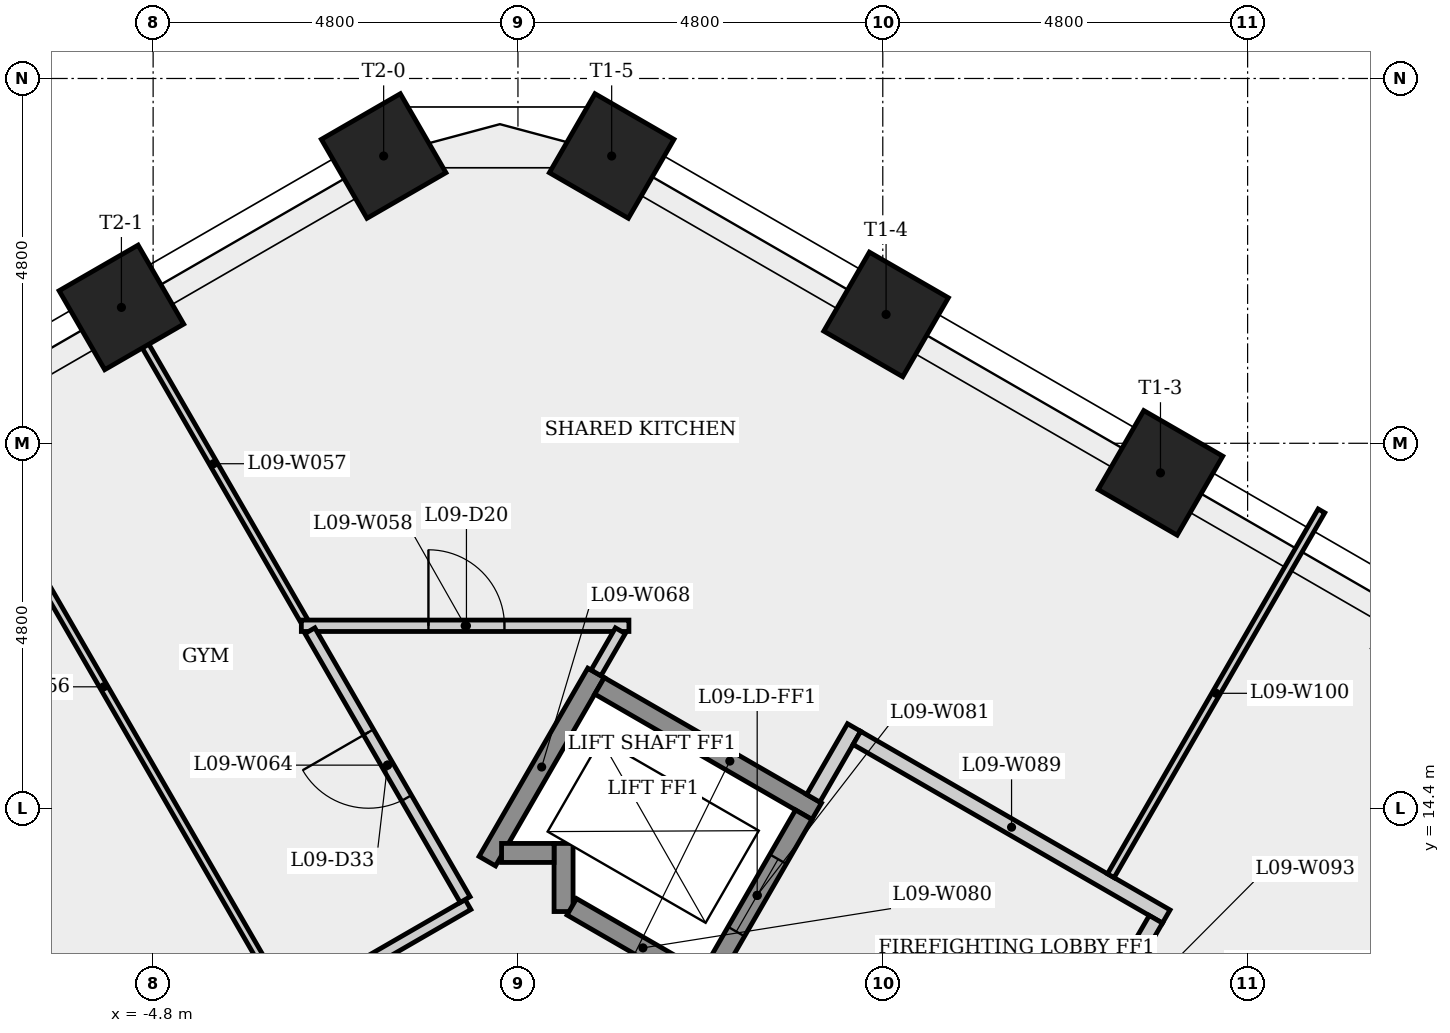
"""IFC4 building model, lengths in metres.
Left out: names, types, materials, properties, quantities, classifications, styles, units other than length and angle.
Written with IfcOpenShell. Run it as: python <this file> out.ifc"""

import sys

from ifc_helpers import new_model, si_unit, direction, frame, frame_2d, origin, origin_2d, place, context, subcontext, project, spatial, rectangle, extrude, element, fill, save


model = new_model("IFC4")
c1 = context("Model", 3, precision=1e-05, world=origin(), true_north=direction((0.0, 1.0)))
c2 = subcontext(c1, "Body", "Model", "MODEL_VIEW")
j1 = project(units=[si_unit("LENGTHUNIT", "METRE"), si_unit("PLANEANGLEUNIT", "RADIAN")], contexts=[c1])
p1 = place(None, origin())
s1 = spatial("IfcSite", under=j1, at=p1, CompositionType="ELEMENT")
p2 = place(p1, origin())
s2 = spatial("IfcBuilding", under=s1, at=p2, CompositionType="ELEMENT")
p3 = place(p2, frame((0.0, 0.0, 39.1)))
s3 = spatial("IfcBuildingStorey", under=s2, at=p3, CompositionType="ELEMENT", Elevation=39.1)
for number, where, z_axis, x_axis in (
    (1, (8.454, 18.811, 0.0), (0.0, 0.0, 1.0), (0.5, 0.866, 0.0)),
    (2, (4.843, 20.895, 0.0), (0.0, 0.0, 1.0), (0.5, 0.866, 0.0)),
    (3, (1.233, 22.98, 0.0), (0.0, 0.0, 1.0), (0.5, 0.866, 0.0)),
    (4, (-1.767, 22.98, 0.0), (0.0, 0.0, 1.0), (-0.5, 0.866, 0.0)),
    (5, (-5.217, 20.988, 0.0), (0.0, 0.0, 1.0), (-0.5, 0.866, 0.0)),
):
    element("IfcColumn", number, at=place(p3, frame(where, z_axis=z_axis, x_axis=x_axis)), inside=s3, PredefinedType="COLUMN", context=c2, shape_type="SweptSolid", body=[
        extrude(rectangle(XDim=1.2, YDim=1.2, at=origin_2d()), origin(), (0.0, 0.0, 1.0), 3.4),
    ])
p4 = place(p3, frame((-10.828, 7.259, 0.0), z_axis=(0.0, 0.0, 1.0), x_axis=(0.866023917287, 0.50000257468, 0.0)))
e6 = element("IfcWall", 6, at=p4, inside=s3, PredefinedType="PARTITIONING", context=c2, shape_type="SweptSolid", body=[
    extrude(rectangle(XDim=11.744, YDim=0.15, at=frame_2d((5.872, 0.0))), origin(), (0.0, 0.0, 1.0), 3.05),
])
p5 = place(p4, frame((5.887, 0.0, 0.0)))
e7 = element("IfcOpeningElement", 7, at=p5, cuts=e6, PredefinedType="OPENING", context=c2, shape_type="SweptSolid", body=[
    extrude(rectangle(XDim=1.0, YDim=2.1, at=frame_2d((0.5, 1.05))), frame((0.0, 0.085, 0.0), z_axis=(0.0, -1.0, 0.0), x_axis=(1.0, 0.0, 0.0)), (0.0, 0.0, 1.0), 0.17),
])
p6 = place(p3, frame((-3.049, 11.836, 0.0), z_axis=(0.0, 0.0, 1.0), x_axis=(-0.500018000043, 0.866015011206, 0.0)))
e8 = element("IfcWall", 8, at=p6, inside=s3, PredefinedType="PARTITIONING", context=c2, shape_type="SweptSolid", body=[
    extrude(rectangle(XDim=9.606, YDim=0.1, at=frame_2d((4.803, 0.0))), origin(), (0.0, 0.0, 1.0), 3.05),
])
p7 = place(p3, frame((-2.812, 16.864, 0.0), z_axis=(0.0, 0.0, 1.0), x_axis=(-0.49998363006, 0.866034854768, 0.0)))
e9 = element("IfcWall", 9, at=p7, inside=s3, PredefinedType="PARTITIONING", context=c2, shape_type="SweptSolid", body=[
    extrude(rectangle(XDim=4.774, YDim=0.1, at=frame_2d((2.387, 0.0))), origin(), (0.0, 0.0, 1.0), 3.05),
])
p8 = place(p3, frame((-2.85, 16.799, 0.0), z_axis=(0.0, 0.0, 1.0), x_axis=(1.0, 0.0, 0.0)))
e10 = element("IfcWall", 10, at=p8, inside=s3, PredefinedType="PARTITIONING", context=c2, shape_type="SweptSolid", body=[
    extrude(rectangle(XDim=4.31, YDim=0.15, at=frame_2d((2.155, 0.0))), origin(), (0.0, 0.0, 1.0), 3.05),
])
p9 = place(p8, frame((1.672, 0.0, 0.0)))
e11 = element("IfcOpeningElement", 11, at=p9, cuts=e10, PredefinedType="OPENING", context=c2, shape_type="SweptSolid", body=[
    extrude(rectangle(XDim=1.0, YDim=2.1, at=frame_2d((0.5, 1.05))), frame((0.0, 0.085, 0.0), z_axis=(0.0, -1.0, 0.0), x_axis=(1.0, 0.0, 0.0)), (0.0, 0.0, 1.0), 0.17),
])
p10 = place(p3, frame((-0.695, 13.196, 0.0), z_axis=(0.0, 0.0, 1.0), x_axis=(-0.49996389635, 0.866046247233, 0.0)))
e12 = element("IfcWall", 12, at=p10, inside=s3, PredefinedType="PARTITIONING", context=c2, shape_type="SweptSolid", body=[
    extrude(rectangle(XDim=4.085, YDim=0.15, at=frame_2d((2.042, 0.0))), origin(), (0.0, 0.0, 1.0), 3.05),
])
p11 = place(p10, frame((1.542, 0.0, 0.0)))
e13 = element("IfcOpeningElement", 13, at=p11, cuts=e12, PredefinedType="OPENING", context=c2, shape_type="SweptSolid", body=[
    extrude(rectangle(XDim=1.0, YDim=2.1, at=frame_2d((0.5, 1.05))), frame((0.0, 0.085, 0.0), z_axis=(0.0, -1.0, 0.0), x_axis=(1.0, 0.0, 0.0)), (0.0, 0.0, 1.0), 0.17),
])
p12 = place(p3, frame((-0.403, 13.702, 0.0), z_axis=(0.0, 0.0, 1.0), x_axis=(0.499976111731, 0.866039195244, 0.0)))
e14 = element("IfcWall", 14, at=p12, inside=s3, PredefinedType="SHEAR", context=c2, shape_type="SweptSolid", body=[
    extrude(rectangle(XDim=2.861, YDim=0.25, at=frame_2d((1.43, 0.0))), origin(), (0.0, 0.0, 1.0), 3.05),
])
p13 = place(p3, frame((0.6, 13.039, 0.0), z_axis=(0.0, 0.0, 1.0), x_axis=(0.0, 1.0, 0.0)))
e15 = element("IfcWall", 15, at=p13, inside=s3, PredefinedType="SHEAR", context=c2, shape_type="SweptSolid", body=[
    extrude(rectangle(XDim=0.896, YDim=0.25, at=frame_2d((0.448, 0.0))), origin(), (0.0, 0.0, 1.0), 3.05),
])
p14 = place(p3, frame((0.475, 13.81, 0.0), z_axis=(0.0, 0.0, 1.0), x_axis=(-1.0, 0.0, 0.0)))
e16 = element("IfcWall", 16, at=p14, inside=s3, PredefinedType="SHEAR", context=c2, shape_type="SweptSolid", body=[
    extrude(rectangle(XDim=0.691, YDim=0.25, at=frame_2d((0.345, 0.0))), origin(), (0.0, 0.0, 1.0), 3.4),
])
p15 = place(p3, frame((1.073, 16.008, 0.0), z_axis=(0.0, 0.0, 1.0), x_axis=(0.866040211805, -0.499974350878, 0.0)))
e17 = element("IfcWall", 17, at=p15, inside=s3, PredefinedType="SHEAR", context=c2, shape_type="SweptSolid", body=[
    extrude(rectangle(XDim=3.3, YDim=0.25, at=frame_2d((1.65, 0.0))), origin(), (0.0, 0.0, 1.0), 3.05),
])
p16 = place(p3, frame((1.347, 16.734, 0.0), z_axis=(0.0, 0.0, 1.0), x_axis=(-0.499909361484, -0.866077727632, 0.0)))
e18 = element("IfcWall", 18, at=p16, inside=s3, PredefinedType="PARTITIONING", context=c2, shape_type="SweptSolid", body=[
    extrude(rectangle(XDim=0.641, YDim=0.15, at=frame_2d((0.32, 0.0))), origin(), (0.0, 0.0, 1.0), 3.05),
])
p17 = place(p3, frame((2.581, 12.02, 0.0), z_axis=(0.0, 0.0, 1.0), x_axis=(-0.86603892542, 0.499976579108, 0.0)))
e19 = element("IfcWall", 19, at=p17, inside=s3, PredefinedType="SHEAR", context=c2, shape_type="SweptSolid", body=[
    extrude(rectangle(XDim=2.162, YDim=0.25, at=frame_2d((1.081, 0.0))), origin(), (0.0, 0.0, 1.0), 3.05),
])
p18 = place(p3, frame((2.535, 12.191, 0.0), z_axis=(0.0, 0.0, 1.0), x_axis=(0.500061746146, 0.865989751695, 0.0)))
e20 = element("IfcWall", 20, at=p18, inside=s3, PredefinedType="SHEAR", context=c2, shape_type="SweptSolid", body=[
    extrude(rectangle(XDim=2.45, YDim=0.25, at=frame_2d((1.225, 0.0))), origin(), (0.0, 0.0, 1.0), 3.4),
])
p19 = place(p18, frame((0.675, 0.0, 0.0)))
e21 = element("IfcOpeningElement", 21, at=p19, cuts=e20, PredefinedType="OPENING", context=c2, shape_type="SweptSolid", body=[
    extrude(rectangle(XDim=1.1, YDim=2.1, at=frame_2d((0.55, 1.05))), frame((0.0, 0.135, 0.0), z_axis=(0.0, -1.0, 0.0), x_axis=(1.0, 0.0, 0.0)), (0.0, 0.0, 1.0), 0.27),
])
p20 = place(p3, frame((3.885, 14.529, 0.0), z_axis=(0.0, 0.0, 1.0), x_axis=(0.499997628298, 0.866026773083, 0.0)))
e22 = element("IfcWall", 22, at=p20, inside=s3, PredefinedType="PARTITIONING", context=c2, shape_type="SweptSolid", body=[
    extrude(rectangle(XDim=1.075, YDim=0.2, at=frame_2d((0.538, 0.0))), origin(), (0.0, 0.0, 1.0), 3.05),
])
p21 = place(p3, frame((4.459, 15.323, 0.0), z_axis=(0.0, 0.0, 1.0), x_axis=(0.866016039709, -0.500016218704, 0.0)))
e23 = element("IfcWall", 23, at=p21, inside=s3, PredefinedType="PARTITIONING", context=c2, shape_type="SweptSolid", body=[
    extrude(rectangle(XDim=4.7, YDim=0.2, at=frame_2d((2.35, 0.0))), origin(), (0.0, 0.0, 1.0), 3.05),
])
p22 = place(p3, frame((6.48, 9.624, 0.0), z_axis=(0.0, 0.0, 1.0), x_axis=(0.500017246033, 0.866015446554, 0.0)))
e24 = element("IfcWall", 24, at=p22, inside=s3, PredefinedType="SHEAR", context=c2, shape_type="SweptSolid", body=[
    extrude(rectangle(XDim=3.25, YDim=0.25, at=frame_2d((1.625, 0.0))), origin(), (0.0, 0.0, 1.0), 3.05),
])
p23 = place(p22, frame((1.125, 0.0, 0.0)))
e25 = element("IfcOpeningElement", 25, at=p23, cuts=e24, PredefinedType="OPENING", context=c2, shape_type="SweptSolid", body=[
    extrude(rectangle(XDim=1.0, YDim=2.1, at=frame_2d((0.5, 1.05))), frame((0.0, 0.135, 0.0), z_axis=(0.0, -1.0, 0.0), x_axis=(1.0, 0.0, 0.0)), (0.0, 0.0, 1.0), 0.27),
])
p24 = place(p3, frame((7.8, 13.51, 0.0), z_axis=(0.0, 0.0, 1.0), x_axis=(0.4999855202, 0.866033763539, 0.0)))
e26 = element("IfcWall", 26, at=p24, inside=s3, PredefinedType="PARTITIONING", context=c2, shape_type="SweptSolid", body=[
    extrude(rectangle(XDim=5.543, YDim=0.1, at=frame_2d((2.771, 0.0))), origin(), (0.0, 0.0, 1.0), 3.05),
])
p25 = place(p3, frame((8.393, 12.937, 0.0), z_axis=(0.0, 0.0, 1.0), x_axis=(-0.500065409566, -0.86598763626, 0.0)))
e27 = element("IfcWall", 27, at=p25, inside=s3, PredefinedType="PARTITIONING", context=c2, shape_type="SweptSolid", body=[
    extrude(rectangle(XDim=0.575, YDim=0.2, at=frame_2d((0.288, 0.0))), origin(), (0.0, 0.0, 1.0), 3.05),
])
p26 = place(p19, origin())
e28 = element("IfcDoor", 28, at=p26, inside=s3, OperationType="SLIDING_TO_LEFT", PredefinedType="DOOR", context=c2, shape_type="SweptSolid", body=[
    extrude(rectangle(XDim=1.1, YDim=2.1, at=frame_2d((0.55, 1.05))), frame((0.0, 0.025, 0.0), z_axis=(0.0, -1.0, 0.0), x_axis=(1.0, 0.0, 0.0)), (0.0, 0.0, 1.0), 0.05),
])
fill(e21, e28)
p27 = place(p9, origin())
e29 = element("IfcDoor", 29, at=p27, inside=s3, OperationType="SINGLE_SWING_LEFT", PredefinedType="DOOR", context=c2, shape_type="SweptSolid", body=[
    extrude(rectangle(XDim=1.0, YDim=2.1, at=frame_2d((0.5, 1.05))), frame((0.0, 0.025, 0.0), z_axis=(0.0, -1.0, 0.0), x_axis=(1.0, 0.0, 0.0)), (0.0, 0.0, 1.0), 0.05),
])
fill(e11, e29)
p28 = place(p11, origin())
e30 = element("IfcDoor", 30, at=p28, inside=s3, OperationType="SINGLE_SWING_RIGHT", PredefinedType="DOOR", context=c2, shape_type="SweptSolid", body=[
    extrude(rectangle(XDim=1.0, YDim=2.1, at=frame_2d((0.5, 1.05))), frame((0.0, 0.025, 0.0), z_axis=(0.0, -1.0, 0.0), x_axis=(1.0, 0.0, 0.0)), (0.0, 0.0, 1.0), 0.05),
])
fill(e13, e30)
save(model, sys.argv[1])
